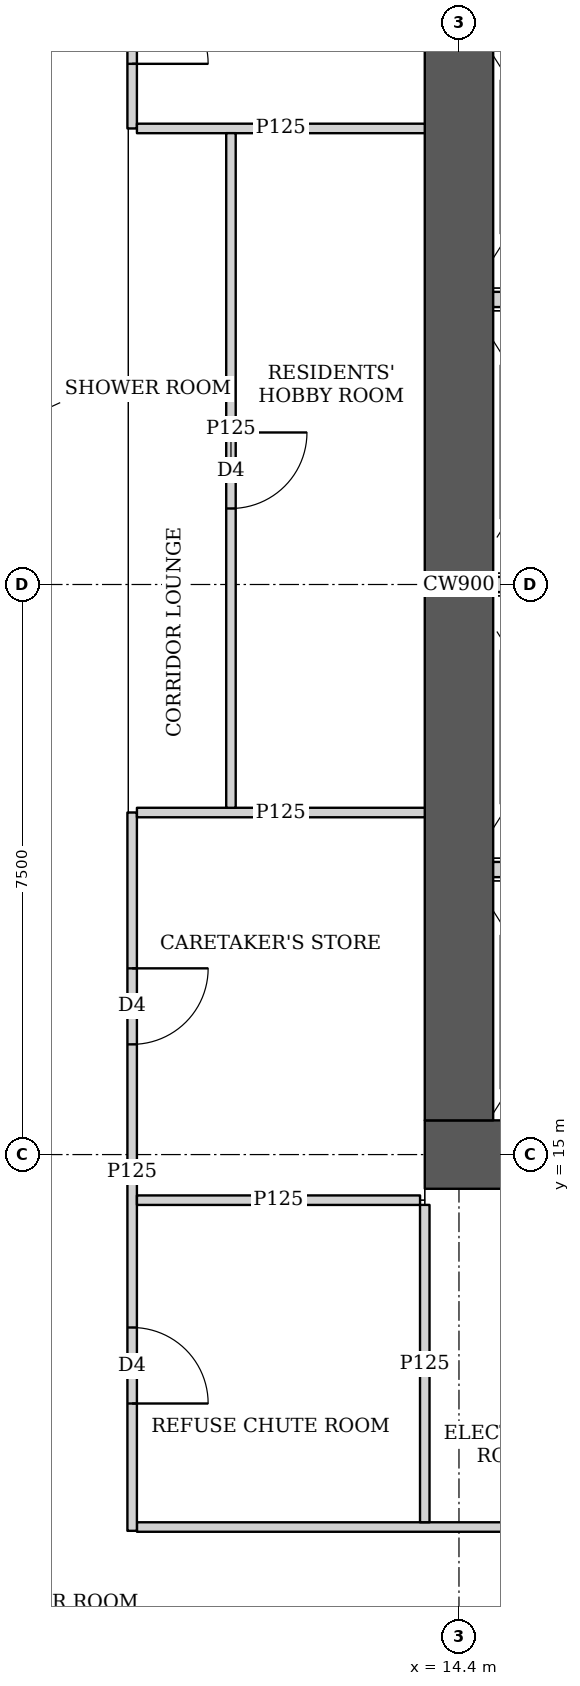
"""IFC4 building model, lengths in metres.
Left out: names, types, materials, properties, quantities, classifications, styles, units other than length and angle.
Written with IfcOpenShell. Run it as: python <this file> out.ifc"""

import sys

from ifc_helpers import new_model, si_unit, direction, frame, frame_2d, origin, place, context, subcontext, project, spatial, rectangle, extrude, element, fill, save


model = new_model("IFC4")
c1 = context("Model", 3, precision=1e-05, world=origin(), true_north=direction((0.0, 1.0)))
c2 = subcontext(c1, "Body", "Model", "MODEL_VIEW")
j1 = project(units=[si_unit("LENGTHUNIT", "METRE"), si_unit("PLANEANGLEUNIT", "RADIAN")], contexts=[c1])
p1 = place(None, origin())
s1 = spatial("IfcSite", under=j1, at=p1, CompositionType="ELEMENT")
p2 = place(p1, origin())
s2 = spatial("IfcBuilding", under=s1, at=p2, CompositionType="ELEMENT")
p3 = place(p2, frame((0.0, 0.0, 100.4)))
s3 = spatial("IfcBuildingStorey", under=s2, at=p3, CompositionType="ELEMENT", Elevation=100.4)
p4 = place(p3, frame((13.95, 15.0, 0.0), z_axis=(0.0, 0.0, 1.0), x_axis=(1.0, 0.0, 0.0)))
e1 = element("IfcWall", 1, at=p4, inside=s3, PredefinedType="SHEAR", context=c2, shape_type="SweptSolid", body=[
    extrude(rectangle(XDim=15.3, YDim=0.9, at=frame_2d((7.65, 0.0))), origin(), (0.0, 0.0, 1.0), 3.75),
])
p5 = place(p4, frame((4.45, 0.0, 0.0)))
e2 = element("IfcOpeningElement", 2, at=p5, cuts=e1, PredefinedType="OPENING", context=c2, shape_type="SweptSolid", body=[
    extrude(rectangle(XDim=1.8, YDim=2.1, at=frame_2d((0.9, 1.05))), frame((0.0, 0.46, 0.0), z_axis=(0.0, -1.0, 0.0), x_axis=(1.0, 0.0, 0.0)), (0.0, 0.0, 1.0), 0.92),
])
p6 = place(p4, frame((10.7, 0.0, 0.0)))
e3 = element("IfcOpeningElement", 3, at=p6, cuts=e1, PredefinedType="OPENING", context=c2, shape_type="SweptSolid", body=[
    extrude(rectangle(XDim=1.1, YDim=2.1, at=frame_2d((0.55, 1.05))), frame((0.0, 0.46, 0.0), z_axis=(0.0, -1.0, 0.0), x_axis=(1.0, 0.0, 0.0)), (0.0, 0.0, 1.0), 0.92),
])
p7 = place(p3, frame((14.4, 15.45, 0.0), z_axis=(0.0, 0.0, 1.0), x_axis=(0.0, 1.0, 0.0)))
e4 = element("IfcWall", 4, at=p7, inside=s3, PredefinedType="SHEAR", context=c2, shape_type="SweptSolid", body=[
    extrude(rectangle(XDim=14.1, YDim=0.9, at=frame_2d((7.05, 0.0))), origin(), (0.0, 0.0, 1.0), 3.75),
])
p8 = place(p3, frame((10.1, 10.05, 0.0), z_axis=(0.0, 0.0, 1.0), x_axis=(0.0, 1.0, 0.0)))
e5 = element("IfcWall", 5, at=p8, inside=s3, PredefinedType="PARTITIONING", context=c2, shape_type="SweptSolid", body=[
    extrude(rectangle(XDim=9.45, YDim=0.125, at=frame_2d((4.725, 0.0))), origin(), (0.0, 0.0, 1.0), 3.5),
])
p9 = place(p8, frame((1.675, 0.0, 0.0)))
e6 = element("IfcOpeningElement", 6, at=p9, cuts=e5, PredefinedType="OPENING", context=c2, shape_type="SweptSolid", body=[
    extrude(rectangle(XDim=1.0, YDim=2.1, at=frame_2d((0.5, 1.05))), frame((0.0, 0.073, 0.0), z_axis=(0.0, -1.0, 0.0), x_axis=(1.0, 0.0, 0.0)), (0.0, 0.0, 1.0), 0.145),
])
p10 = place(p8, frame((6.4, 0.0, 0.0)))
e7 = element("IfcOpeningElement", 7, at=p10, cuts=e5, PredefinedType="OPENING", context=c2, shape_type="SweptSolid", body=[
    extrude(rectangle(XDim=1.0, YDim=2.1, at=frame_2d((0.5, 1.05))), frame((0.0, 0.073, 0.0), z_axis=(0.0, -1.0, 0.0), x_axis=(1.0, 0.0, 0.0)), (0.0, 0.0, 1.0), 0.145),
])
p11 = place(p3, frame((10.1, 28.5, 0.0), z_axis=(0.0, 0.0, 1.0), x_axis=(0.0, 1.0, 0.0)))
e8 = element("IfcWall", 8, at=p11, inside=s3, PredefinedType="PARTITIONING", context=c2, shape_type="SweptSolid", body=[
    extrude(rectangle(XDim=6.45, YDim=0.125, at=frame_2d((3.225, 0.0))), origin(), (0.0, 0.0, 1.0), 3.5),
])
p12 = place(p11, frame((0.85, 0.0, 0.0)))
e9 = element("IfcOpeningElement", 9, at=p12, cuts=e8, PredefinedType="OPENING", context=c2, shape_type="SweptSolid", body=[
    extrude(rectangle(XDim=1.0, YDim=2.1, at=frame_2d((0.5, 1.05))), frame((0.0, 0.073, 0.0), z_axis=(0.0, -1.0, 0.0), x_axis=(1.0, 0.0, 0.0)), (0.0, 0.0, 1.0), 0.145),
])
p13 = place(p11, frame((4.075, 0.0, 0.0)))
e10 = element("IfcOpeningElement", 10, at=p13, cuts=e8, PredefinedType="OPENING", context=c2, shape_type="SweptSolid", body=[
    extrude(rectangle(XDim=1.0, YDim=2.1, at=frame_2d((0.5, 1.05))), frame((0.0, 0.073, 0.0), z_axis=(0.0, -1.0, 0.0), x_axis=(1.0, 0.0, 0.0)), (0.0, 0.0, 1.0), 0.145),
])
p14 = place(p3, frame((11.4, 19.562, 0.0), z_axis=(0.0, 0.0, 1.0), x_axis=(0.0, 1.0, 0.0)))
e11 = element("IfcWall", 11, at=p14, inside=s3, PredefinedType="PARTITIONING", context=c2, shape_type="SweptSolid", body=[
    extrude(rectangle(XDim=8.876, YDim=0.125, at=frame_2d((4.438, 0.0))), origin(), (0.0, 0.0, 1.0), 3.5),
])
p15 = place(p14, frame((3.938, 0.0, 0.0)))
e12 = element("IfcOpeningElement", 12, at=p15, cuts=e11, PredefinedType="OPENING", context=c2, shape_type="SweptSolid", body=[
    extrude(rectangle(XDim=1.0, YDim=2.1, at=frame_2d((0.5, 1.05))), frame((0.0, 0.073, 0.0), z_axis=(0.0, -1.0, 0.0), x_axis=(1.0, 0.0, 0.0)), (0.0, 0.0, 1.0), 0.145),
])
p16 = place(p3, frame((10.163, 14.4, 0.0), z_axis=(0.0, 0.0, 1.0), x_axis=(1.0, 0.0, 0.0)))
e13 = element("IfcWall", 13, at=p16, inside=s3, PredefinedType="PARTITIONING", context=c2, shape_type="SweptSolid", body=[
    extrude(rectangle(XDim=3.725, YDim=0.125, at=frame_2d((1.862, 0.0))), origin(), (0.0, 0.0, 1.0), 3.5),
])
for number, where, z_axis, x_axis in (
    (14, (10.163, 19.5, 0.0), (0.0, 0.0, 1.0), (1.0, 0.0, 0.0)),
    (15, (10.163, 28.5, 0.0), (0.0, 0.0, 1.0), (1.0, 0.0, 0.0)),
):
    element("IfcWall", number, at=place(p3, frame(where, z_axis=z_axis, x_axis=x_axis)), inside=s3, PredefinedType="PARTITIONING", context=c2, shape_type="SweptSolid", body=[
        extrude(rectangle(XDim=3.787, YDim=0.125, at=frame_2d((1.894, 0.0))), origin(), (0.0, 0.0, 1.0), 3.5),
    ])
p17 = place(p3, frame((13.95, 10.163, 0.0), z_axis=(0.0, 0.0, 1.0), x_axis=(0.0, 1.0, 0.0)))
e16 = element("IfcWall", 16, at=p17, inside=s3, PredefinedType="PARTITIONING", context=c2, shape_type="SweptSolid", body=[
    extrude(rectangle(XDim=4.175, YDim=0.125, at=frame_2d((2.087, 0.0))), origin(), (0.0, 0.0, 1.0), 3.5),
])
p18 = place(p3, frame((10.163, 10.1, 0.0), z_axis=(0.0, 0.0, 1.0), x_axis=(1.0, 0.0, 0.0)))
e17 = element("IfcWall", 17, at=p18, inside=s3, PredefinedType="PARTITIONING", context=c2, shape_type="SweptSolid", body=[
    extrude(rectangle(XDim=11.287, YDim=0.125, at=frame_2d((5.644, 0.0))), origin(), (0.0, 0.0, 1.0), 3.5),
])
p19 = place(p18, frame((7.832, 0.0, 0.0)))
e18 = element("IfcOpeningElement", 18, at=p19, cuts=e17, PredefinedType="OPENING", context=c2, shape_type="SweptSolid", body=[
    extrude(rectangle(XDim=1.8, YDim=2.1, at=frame_2d((0.9, 1.05))), frame((0.0, 0.073, 0.0), z_axis=(0.0, -1.0, 0.0), x_axis=(1.0, 0.0, 0.0)), (0.0, 0.0, 1.0), 0.145),
])
for number, where, z_axis, x_axis in (
    (19, (14.85, 18.75, 0.0), (0.0, 0.0, 1.0), (1.0, 0.0, 0.0)),
    (20, (14.85, 22.5, 0.0), (0.0, 0.0, 1.0), (1.0, 0.0, 0.0)),
    (21, (14.85, 26.25, 0.0), (0.0, 0.0, 1.0), (1.0, 0.0, 0.0)),
):
    element("IfcWall", number, at=place(p3, frame(where, z_axis=z_axis, x_axis=x_axis)), inside=s3, PredefinedType="SOLIDWALL", context=c2, shape_type="SweptSolid", body=[
        extrude(rectangle(XDim=1.95, YDim=0.2, at=frame_2d((0.975, 0.0))), origin(), (0.0, 0.0, 1.0), 3.5),
    ])
p20 = place(p9, origin())
e22 = element("IfcDoor", 22, at=p20, inside=s3, OperationType="SINGLE_SWING_RIGHT", PredefinedType="DOOR", context=c2, shape_type="SweptSolid", body=[
    extrude(rectangle(XDim=1.0, YDim=2.1, at=frame_2d((0.5, 1.05))), frame((0.0, 0.025, 0.0), z_axis=(0.0, -1.0, 0.0), x_axis=(1.0, 0.0, 0.0)), (0.0, 0.0, 1.0), 0.05),
])
fill(e6, e22)
p21 = place(p10, origin())
e23 = element("IfcDoor", 23, at=p21, inside=s3, OperationType="SINGLE_SWING_LEFT", PredefinedType="DOOR", context=c2, shape_type="SweptSolid", body=[
    extrude(rectangle(XDim=1.0, YDim=2.1, at=frame_2d((0.5, 1.05))), frame((0.0, 0.025, 0.0), z_axis=(0.0, -1.0, 0.0), x_axis=(1.0, 0.0, 0.0)), (0.0, 0.0, 1.0), 0.05),
])
fill(e7, e23)
p22 = place(p15, origin())
e24 = element("IfcDoor", 24, at=p22, inside=s3, OperationType="SINGLE_SWING_LEFT", PredefinedType="DOOR", context=c2, shape_type="SweptSolid", body=[
    extrude(rectangle(XDim=1.0, YDim=2.1, at=frame_2d((0.5, 1.05))), frame((0.0, 0.025, 0.0), z_axis=(0.0, -1.0, 0.0), x_axis=(1.0, 0.0, 0.0)), (0.0, 0.0, 1.0), 0.05),
])
fill(e12, e24)
p23 = place(p12, origin())
e25 = element("IfcDoor", 25, at=p23, inside=s3, OperationType="SINGLE_SWING_RIGHT", PredefinedType="DOOR", context=c2, shape_type="SweptSolid", body=[
    extrude(rectangle(XDim=1.0, YDim=2.1, at=frame_2d((0.5, 1.05))), frame((0.0, 0.025, 0.0), z_axis=(0.0, -1.0, 0.0), x_axis=(1.0, 0.0, 0.0)), (0.0, 0.0, 1.0), 0.05),
])
fill(e9, e25)
save(model, sys.argv[1])
